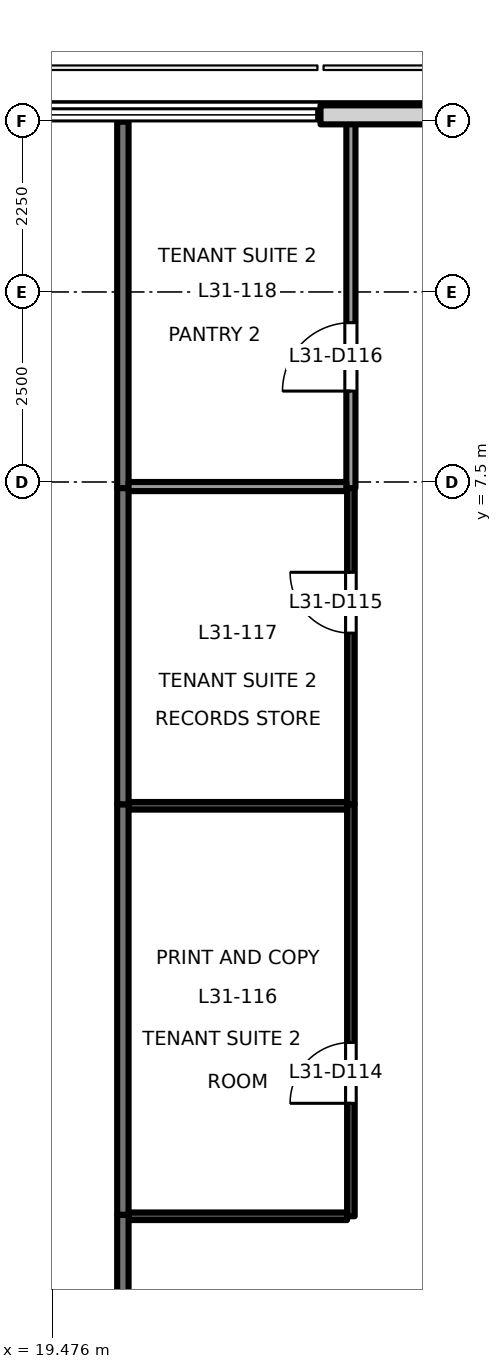
"""IFC4 building model, lengths in metres.
Left out: names, types, materials, properties, quantities, classifications, styles, units other than length and angle.
Written with IfcOpenShell. Run it as: python <this file> out.ifc"""

import sys

from ifc_helpers import new_model, si_unit, direction, frame, frame_2d, origin, place, context, subcontext, project, spatial, rectangle, extrude, element, fill, save


model = new_model("IFC4")
c1 = context("Model", 3, precision=1e-05, world=origin(), true_north=direction((0.0, 1.0)))
c2 = subcontext(c1, "Body", "Model", "MODEL_VIEW")
j1 = project(units=[si_unit("LENGTHUNIT", "METRE"), si_unit("PLANEANGLEUNIT", "RADIAN")], contexts=[c1])
p1 = place(None, origin())
s1 = spatial("IfcSite", under=j1, at=p1, CompositionType="ELEMENT")
p2 = place(p1, origin())
s2 = spatial("IfcBuilding", under=s1, at=p2, CompositionType="ELEMENT")
p3 = place(p2, frame((0.0, 0.0, 138.1)))
s3 = spatial("IfcBuildingStorey", under=s2, at=p3, CompositionType="ELEMENT", Elevation=138.1)
p4 = place(p3, frame((25.955, 12.33, 0.0), z_axis=(0.0, 0.0, 1.0), x_axis=(-1.0, 0.0, 0.0)))
e1 = element("IfcWall", 1, at=p4, inside=s3, PredefinedType="SOLIDWALL", context=c2, shape_type="SweptSolid", body=[
    extrude(rectangle(XDim=2.955, YDim=0.25, at=frame_2d((1.478, 0.0))), origin(), (0.0, 0.0, 1.0), 3.8),
])
p5 = place(p3, frame((20.4, -2.14, 0.0), z_axis=(0.0, 0.0, 1.0), x_axis=(0.0, -1.0, 0.0)))
e2 = element("IfcWall", 2, at=p5, inside=s3, PredefinedType="PARTITIONING", context=c2, shape_type="SweptSolid", body=[
    extrude(rectangle(XDim=6.04, YDim=0.15, at=frame_2d((3.02, 0.0))), origin(), (0.0, 0.0, 1.0), 3.3),
])
p6 = place(p5, frame((3.055, 0.0, 0.0)))
e3 = element("IfcOpeningElement", 3, at=p6, cuts=e2, PredefinedType="OPENING", context=c2, shape_type="SweptSolid", body=[
    extrude(rectangle(XDim=1.8, YDim=2.1, at=frame_2d((0.9, 1.05))), frame((0.0, 0.085, 0.0), z_axis=(0.0, -1.0, 0.0), x_axis=(1.0, 0.0, 0.0)), (0.0, 0.0, 1.0), 0.171),
])
p7 = place(p3, frame((20.4, 3.26, 0.0), z_axis=(0.0, 0.0, 1.0), x_axis=(0.0, -1.0, 0.0)))
e4 = element("IfcWall", 4, at=p7, inside=s3, PredefinedType="PARTITIONING", context=c2, shape_type="SweptSolid", body=[
    extrude(rectangle(XDim=5.4, YDim=0.15, at=frame_2d((2.7, 0.0))), origin(), (0.0, 0.0, 1.0), 3.3),
])
p8 = place(p3, frame((20.4, 7.42, 0.0), z_axis=(0.0, 0.0, 1.0), x_axis=(0.0, -1.0, 0.0)))
e5 = element("IfcWall", 5, at=p8, inside=s3, PredefinedType="PARTITIONING", context=c2, shape_type="SweptSolid", body=[
    extrude(rectangle(XDim=4.16, YDim=0.15, at=frame_2d((2.08, 0.0))), origin(), (0.0, 0.0, 1.0), 3.3),
])
p9 = place(p3, frame((20.4, 12.24, 0.0), z_axis=(0.0, 0.0, 1.0), x_axis=(0.0, -1.0, 0.0)))
e6 = element("IfcWall", 6, at=p9, inside=s3, PredefinedType="PARTITIONING", context=c2, shape_type="SweptSolid", body=[
    extrude(rectangle(XDim=4.82, YDim=0.15, at=frame_2d((2.41, 0.0))), origin(), (0.0, 0.0, 1.0), 3.8),
])
p10 = place(p3, frame((20.475, -2.16, 0.0), z_axis=(0.0, 0.0, 1.0), x_axis=(1.0, 0.0, 0.0)))
e7 = element("IfcWall", 7, at=p10, inside=s3, PredefinedType="PARTITIONING", context=c2, shape_type="SweptSolid", body=[
    extrude(rectangle(XDim=2.875, YDim=0.1, at=frame_2d((1.438, 0.0))), origin(), (0.0, 0.0, 1.0), 3.8),
])
p11 = place(p3, frame((23.4, -2.16, 0.0), z_axis=(0.0, 0.0, 1.0), x_axis=(0.0, 1.0, 0.0)))
e8 = element("IfcWall", 8, at=p11, inside=s3, PredefinedType="PARTITIONING", context=c2, shape_type="SweptSolid", body=[
    extrude(rectangle(XDim=5.42, YDim=0.1, at=frame_2d((2.71, 0.0))), origin(), (0.0, 0.0, 1.0), 3.3),
])
p12 = place(p11, frame((1.486, 0.0, 0.0)))
e9 = element("IfcOpeningElement", 9, at=p12, cuts=e8, PredefinedType="OPENING", context=c2, shape_type="SweptSolid", body=[
    extrude(rectangle(XDim=0.8, YDim=2.1, at=frame_2d((0.4, 1.05))), frame((0.0, 0.061, 0.0), z_axis=(0.0, -1.0, 0.0), x_axis=(1.0, 0.0, 0.0)), (0.0, 0.0, 1.0), 0.121),
])
p13 = place(p3, frame((23.4, 3.26, 0.0), z_axis=(0.0, 0.0, 1.0), x_axis=(0.0, 1.0, 0.0)))
e10 = element("IfcWall", 10, at=p13, inside=s3, PredefinedType="PARTITIONING", context=c2, shape_type="SweptSolid", body=[
    extrude(rectangle(XDim=4.16, YDim=0.1, at=frame_2d((2.08, 0.0))), origin(), (0.0, 0.0, 1.0), 3.3),
])
p14 = place(p13, frame((2.252, 0.0, 0.0)))
e11 = element("IfcOpeningElement", 11, at=p14, cuts=e10, PredefinedType="OPENING", context=c2, shape_type="SweptSolid", body=[
    extrude(rectangle(XDim=0.8, YDim=2.1, at=frame_2d((0.4, 1.05))), frame((0.0, 0.061, 0.0), z_axis=(0.0, -1.0, 0.0), x_axis=(1.0, 0.0, 0.0)), (0.0, 0.0, 1.0), 0.121),
])
p15 = place(p3, frame((23.4, 7.42, 0.0), z_axis=(0.0, 0.0, 1.0), x_axis=(0.0, 1.0, 0.0)))
e12 = element("IfcWall", 12, at=p15, inside=s3, PredefinedType="PARTITIONING", context=c2, shape_type="SweptSolid", body=[
    extrude(rectangle(XDim=4.82, YDim=0.12, at=frame_2d((2.41, 0.0))), origin(), (0.0, 0.0, 1.0), 3.8),
])
p16 = place(p15, frame((1.276, 0.0, 0.0)))
e13 = element("IfcOpeningElement", 13, at=p16, cuts=e12, PredefinedType="OPENING", context=c2, shape_type="SweptSolid", body=[
    extrude(rectangle(XDim=0.9, YDim=2.1, at=frame_2d((0.45, 1.05))), frame((0.0, 0.071, 0.0), z_axis=(0.0, -1.0, 0.0), x_axis=(1.0, 0.0, 0.0)), (0.0, 0.0, 1.0), 0.141),
])
p17 = place(p3, frame((20.475, 3.24, 0.0), z_axis=(0.0, 0.0, 1.0), x_axis=(1.0, 0.0, 0.0)))
e14 = element("IfcWall", 14, at=p17, inside=s3, PredefinedType="PARTITIONING", context=c2, shape_type="SweptSolid", body=[
    extrude(rectangle(XDim=2.875, YDim=0.1, at=frame_2d((1.438, 0.0))), origin(), (0.0, 0.0, 1.0), 3.8),
])
p18 = place(p3, frame((20.475, 7.44, 0.0), z_axis=(0.0, 0.0, 1.0), x_axis=(1.0, 0.0, 0.0)))
e15 = element("IfcWall", 15, at=p18, inside=s3, PredefinedType="PARTITIONING", context=c2, shape_type="SweptSolid", body=[
    extrude(rectangle(XDim=2.865, YDim=0.12, at=frame_2d((1.433, 0.0))), origin(), (0.0, 0.0, 1.0), 3.8),
])
p19 = place(p12, origin())
e16 = element("IfcDoor", 16, at=p19, inside=s3, OperationType="SINGLE_SWING_LEFT", PredefinedType="DOOR", context=c2, shape_type="SweptSolid", body=[
    extrude(rectangle(XDim=0.8, YDim=2.1, at=frame_2d((0.4, 1.05))), frame((0.0, 0.025, 0.0), z_axis=(0.0, -1.0, 0.0), x_axis=(1.0, 0.0, 0.0)), (0.0, 0.0, 1.0), 0.05),
])
fill(e9, e16)
p20 = place(p14, origin())
e17 = element("IfcDoor", 17, at=p20, inside=s3, OperationType="SINGLE_SWING_RIGHT", PredefinedType="DOOR", context=c2, shape_type="SweptSolid", body=[
    extrude(rectangle(XDim=0.8, YDim=2.1, at=frame_2d((0.4, 1.05))), frame((0.0, 0.025, 0.0), z_axis=(0.0, -1.0, 0.0), x_axis=(1.0, 0.0, 0.0)), (0.0, 0.0, 1.0), 0.05),
])
fill(e11, e17)
p21 = place(p16, origin())
e18 = element("IfcDoor", 18, at=p21, inside=s3, OperationType="SINGLE_SWING_LEFT", PredefinedType="DOOR", context=c2, shape_type="SweptSolid", body=[
    extrude(rectangle(XDim=0.9, YDim=2.1, at=frame_2d((0.45, 1.05))), frame((0.0, 0.025, 0.0), z_axis=(0.0, -1.0, 0.0), x_axis=(1.0, 0.0, 0.0)), (0.0, 0.0, 1.0), 0.05),
])
fill(e13, e18)
save(model, sys.argv[1])
